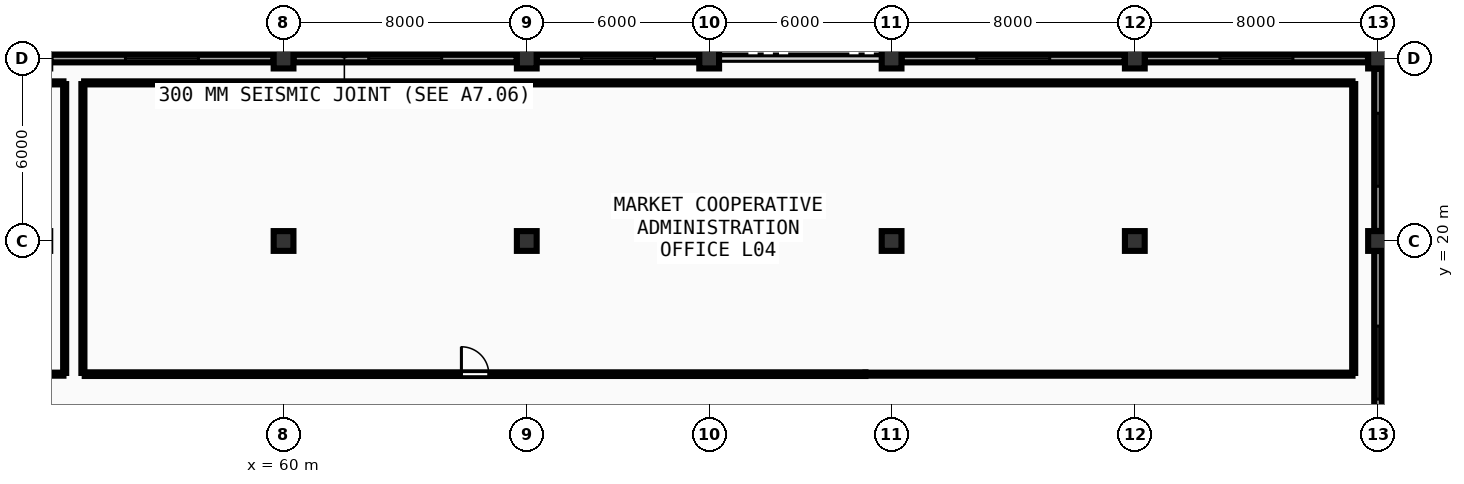
"""IFC4 building model, lengths in metres.
Left out: names, types, materials, properties, quantities, classifications, styles, units other than length and angle.
Written with IfcOpenShell. Run it as: python <this file> out.ifc"""

import sys

from ifc_helpers import new_model, si_unit, direction, frame, frame_2d, origin, origin_2d, place, context, subcontext, project, spatial, rectangle, extrude, element, fill, save


model = new_model("IFC4")
c1 = context("Model", 3, precision=1e-05, world=origin(), true_north=direction((0.0, 1.0)))
c2 = subcontext(c1, "Body", "Model", "MODEL_VIEW")
j1 = project(units=[si_unit("LENGTHUNIT", "METRE"), si_unit("PLANEANGLEUNIT", "RADIAN")], contexts=[c1])
p1 = place(None, origin())
s1 = spatial("IfcSite", under=j1, at=p1, CompositionType="ELEMENT")
p2 = place(p1, origin())
s2 = spatial("IfcBuilding", under=s1, at=p2, CompositionType="ELEMENT")
p3 = place(p2, frame((0.0, 0.0, 18.0)))
s3 = spatial("IfcBuildingStorey", under=s2, at=p3, CompositionType="ELEMENT", Elevation=18.0)
for number, where, z_axis, x_axis in (
    (1, (60.0, 20.0, 0.0), (0.0, 0.0, 1.0), (1.0, 0.0, 0.0)),
    (2, (60.0, 26.0, 0.0), (0.0, 0.0, 1.0), (1.0, 0.0, 0.0)),
    (3, (68.0, 20.0, 0.0), (0.0, 0.0, 1.0), (1.0, 0.0, 0.0)),
    (4, (68.0, 26.0, 0.0), (0.0, 0.0, 1.0), (1.0, 0.0, 0.0)),
    (5, (74.0, 20.0, 0.0), (0.0, 0.0, 1.0), (1.0, 0.0, 0.0)),
    (6, (74.0, 26.0, 0.0), (0.0, 0.0, 1.0), (1.0, 0.0, 0.0)),
    (7, (80.0, 20.0, 0.0), (0.0, 0.0, 1.0), (1.0, 0.0, 0.0)),
    (8, (80.0, 26.0, 0.0), (0.0, 0.0, 1.0), (1.0, 0.0, 0.0)),
    (9, (88.0, 20.0, 0.0), (0.0, 0.0, 1.0), (1.0, 0.0, 0.0)),
    (10, (88.0, 26.0, 0.0), (0.0, 0.0, 1.0), (1.0, 0.0, 0.0)),
    (11, (96.0, 20.0, 0.0), (0.0, 0.0, 1.0), (1.0, 0.0, 0.0)),
    (12, (96.0, 26.0, 0.0), (0.0, 0.0, 1.0), (1.0, 0.0, 0.0)),
):
    element("IfcColumn", number, at=place(p3, frame(where, z_axis=z_axis, x_axis=x_axis)), inside=s3, PredefinedType="COLUMN", context=c2, shape_type="SweptSolid", body=[
        extrude(rectangle(XDim=0.65, YDim=0.65, at=origin_2d()), origin(), (0.0, 0.0, 1.0), 4.5),
    ])
p4 = place(p3, frame((96.0, 12.33, 0.0), z_axis=(0.0, 0.0, 1.0), x_axis=(0.0, 1.0, 0.0)))
e13 = element("IfcWall", 13, at=p4, inside=s3, PredefinedType="SOLIDWALL", context=c2, shape_type="SweptSolid", body=[
    extrude(rectangle(XDim=7.34, YDim=0.25, at=frame_2d((3.67, 0.0))), origin(), (0.0, 0.0, 1.0), 3.44),
])
p5 = place(p4, frame((2.47, 0.0, 0.95)))
e14 = element("IfcOpeningElement", 14, at=p5, cuts=e13, PredefinedType="OPENING", context=c2, shape_type="SweptSolid", body=[
    extrude(rectangle(XDim=2.4, YDim=1.65, at=frame_2d((1.2, 0.825))), frame((0.0, 0.135, 0.0), z_axis=(0.0, -1.0, 0.0), x_axis=(1.0, 0.0, 0.0)), (0.0, 0.0, 1.0), 0.27),
])
p6 = place(p3, frame((96.0, 20.33, 0.0), z_axis=(0.0, 0.0, 1.0), x_axis=(0.0, 1.0, 0.0)))
e15 = element("IfcWall", 15, at=p6, inside=s3, PredefinedType="SOLIDWALL", context=c2, shape_type="SweptSolid", body=[
    extrude(rectangle(XDim=5.34, YDim=0.25, at=frame_2d((2.67, 0.0))), origin(), (0.0, 0.0, 1.0), 3.44),
])
p7 = place(p6, frame((1.47, 0.0, 0.95)))
e16 = element("IfcOpeningElement", 16, at=p7, cuts=e15, PredefinedType="OPENING", context=c2, shape_type="SweptSolid", body=[
    extrude(rectangle(XDim=2.4, YDim=1.65, at=frame_2d((1.2, 0.825))), frame((0.0, 0.135, 0.0), z_axis=(0.0, -1.0, 0.0), x_axis=(1.0, 0.0, 0.0)), (0.0, 0.0, 1.0), 0.27),
])
p8 = place(p3, frame((95.67, 26.0, 0.0), z_axis=(0.0, 0.0, 1.0), x_axis=(-1.0, 0.0, 0.0)))
e17 = element("IfcWall", 17, at=p8, inside=s3, PredefinedType="SOLIDWALL", context=c2, shape_type="SweptSolid", body=[
    extrude(rectangle(XDim=7.34, YDim=0.25, at=frame_2d((3.67, 0.0))), origin(), (0.0, 0.0, 1.0), 3.44),
])
p9 = place(p8, frame((2.47, 0.0, 0.95)))
e18 = element("IfcOpeningElement", 18, at=p9, cuts=e17, PredefinedType="OPENING", context=c2, shape_type="SweptSolid", body=[
    extrude(rectangle(XDim=2.4, YDim=1.65, at=frame_2d((1.2, 0.825))), frame((0.0, 0.135, 0.0), z_axis=(0.0, -1.0, 0.0), x_axis=(1.0, 0.0, 0.0)), (0.0, 0.0, 1.0), 0.27),
])
p10 = place(p3, frame((87.67, 26.0, 0.0), z_axis=(0.0, 0.0, 1.0), x_axis=(-1.0, 0.0, 0.0)))
e19 = element("IfcWall", 19, at=p10, inside=s3, PredefinedType="SOLIDWALL", context=c2, shape_type="SweptSolid", body=[
    extrude(rectangle(XDim=7.34, YDim=0.25, at=frame_2d((3.67, 0.0))), origin(), (0.0, 0.0, 1.0), 3.44),
])
p11 = place(p10, frame((2.47, 0.0, 0.95)))
e20 = element("IfcOpeningElement", 20, at=p11, cuts=e19, PredefinedType="OPENING", context=c2, shape_type="SweptSolid", body=[
    extrude(rectangle(XDim=2.4, YDim=1.65, at=frame_2d((1.2, 0.825))), frame((0.0, 0.135, 0.0), z_axis=(0.0, -1.0, 0.0), x_axis=(1.0, 0.0, 0.0)), (0.0, 0.0, 1.0), 0.27),
])
p12 = place(p3, frame((73.67, 26.0, 0.0), z_axis=(0.0, 0.0, 1.0), x_axis=(-1.0, 0.0, 0.0)))
e21 = element("IfcWall", 21, at=p12, inside=s3, PredefinedType="SOLIDWALL", context=c2, shape_type="SweptSolid", body=[
    extrude(rectangle(XDim=5.34, YDim=0.25, at=frame_2d((2.67, 0.0))), origin(), (0.0, 0.0, 1.0), 3.44),
])
p13 = place(p12, frame((1.47, 0.0, 0.95)))
e22 = element("IfcOpeningElement", 22, at=p13, cuts=e21, PredefinedType="OPENING", context=c2, shape_type="SweptSolid", body=[
    extrude(rectangle(XDim=2.4, YDim=1.65, at=frame_2d((1.2, 0.825))), frame((0.0, 0.135, 0.0), z_axis=(0.0, -1.0, 0.0), x_axis=(1.0, 0.0, 0.0)), (0.0, 0.0, 1.0), 0.27),
])
p14 = place(p3, frame((67.67, 26.0, 0.0), z_axis=(0.0, 0.0, 1.0), x_axis=(-1.0, 0.0, 0.0)))
e23 = element("IfcWall", 23, at=p14, inside=s3, PredefinedType="SOLIDWALL", context=c2, shape_type="SweptSolid", body=[
    extrude(rectangle(XDim=7.34, YDim=0.25, at=frame_2d((3.67, 0.0))), origin(), (0.0, 0.0, 1.0), 3.44),
])
p15 = place(p14, frame((2.47, 0.0, 0.95)))
e24 = element("IfcOpeningElement", 24, at=p15, cuts=e23, PredefinedType="OPENING", context=c2, shape_type="SweptSolid", body=[
    extrude(rectangle(XDim=2.4, YDim=1.65, at=frame_2d((1.2, 0.825))), frame((0.0, 0.135, 0.0), z_axis=(0.0, -1.0, 0.0), x_axis=(1.0, 0.0, 0.0)), (0.0, 0.0, 1.0), 0.27),
])
p16 = place(p3, frame((59.67, 26.0, 0.0), z_axis=(0.0, 0.0, 1.0), x_axis=(-1.0, 0.0, 0.0)))
e25 = element("IfcWall", 25, at=p16, inside=s3, PredefinedType="SOLIDWALL", context=c2, shape_type="SweptSolid", body=[
    extrude(rectangle(XDim=7.34, YDim=0.25, at=frame_2d((3.67, 0.0))), origin(), (0.0, 0.0, 1.0), 3.44),
])
p17 = place(p16, frame((2.47, 0.0, 0.95)))
e26 = element("IfcOpeningElement", 26, at=p17, cuts=e25, PredefinedType="OPENING", context=c2, shape_type="SweptSolid", body=[
    extrude(rectangle(XDim=2.4, YDim=1.65, at=frame_2d((1.2, 0.825))), frame((0.0, 0.135, 0.0), z_axis=(0.0, -1.0, 0.0), x_axis=(1.0, 0.0, 0.0)), (0.0, 0.0, 1.0), 0.27),
])
p18 = place(p3, frame((53.46, 15.62, 0.0), z_axis=(0.0, 0.0, 1.0), x_axis=(1.0, 0.0, 0.0)))
e27 = element("IfcWall", 27, at=p18, inside=s3, PredefinedType="PARTITIONING", context=c2, shape_type="SweptSolid", body=[
    extrude(rectangle(XDim=25.68, YDim=0.12, at=frame_2d((12.84, 0.0))), origin(), (0.0, 0.0, 1.0), 3.445),
])
p19 = place(p18, frame((12.39, 0.0, 0.0)))
e28 = element("IfcOpeningElement", 28, at=p19, cuts=e27, PredefinedType="OPENING", context=c2, shape_type="SweptSolid", body=[
    extrude(rectangle(XDim=0.9, YDim=2.08, at=frame_2d((0.45, 1.04))), frame((0.0, 0.07, 0.0), z_axis=(0.0, -1.0, 0.0), x_axis=(1.0, 0.0, 0.0)), (0.0, 0.0, 1.0), 0.14),
])
p20 = place(p3, frame((51.14, 15.62, 0.0), z_axis=(0.0, 0.0, 1.0), x_axis=(1.0, 0.0, 0.0)))
e29 = element("IfcWall", 29, at=p20, inside=s3, PredefinedType="PARTITIONING", context=c2, shape_type="SweptSolid", body=[
    extrude(rectangle(XDim=1.62, YDim=0.1, at=frame_2d((0.81, 0.0))), origin(), (0.0, 0.0, 1.0), 3.445),
])
p21 = place(p3, frame((52.8, 15.66, 0.0), z_axis=(0.0, 0.0, 1.0), x_axis=(0.0, 1.0, 0.0)))
e30 = element("IfcWall", 30, at=p21, inside=s3, PredefinedType="PARTITIONING", context=c2, shape_type="SweptSolid", body=[
    extrude(rectangle(XDim=9.5, YDim=0.1, at=frame_2d((4.75, 0.0))), origin(), (0.0, 0.0, 1.0), 3.445),
])
p22 = place(p3, frame((52.76, 25.2, 0.0), z_axis=(0.0, 0.0, 1.0), x_axis=(-1.0, 0.0, 0.0)))
e31 = element("IfcWall", 31, at=p22, inside=s3, PredefinedType="PARTITIONING", context=c2, shape_type="SweptSolid", body=[
    extrude(rectangle(XDim=15.92, YDim=0.1, at=frame_2d((7.96, 0.0))), origin(), (0.0, 0.0, 1.0), 3.445),
])
p23 = place(p3, frame((79.14, 15.62, 0.0), z_axis=(0.0, 0.0, 1.0), x_axis=(1.0, 0.0, 0.0)))
e32 = element("IfcWall", 32, at=p23, inside=s3, PredefinedType="PARTITIONING", context=c2, shape_type="SweptSolid", body=[
    extrude(rectangle(XDim=16.02, YDim=0.1, at=frame_2d((8.01, 0.0))), origin(), (0.0, 0.0, 1.0), 3.445),
])
p24 = place(p3, frame((95.2, 15.66, 0.0), z_axis=(0.0, 0.0, 1.0), x_axis=(0.0, 1.0, 0.0)))
e33 = element("IfcWall", 33, at=p24, inside=s3, PredefinedType="PARTITIONING", context=c2, shape_type="SweptSolid", body=[
    extrude(rectangle(XDim=9.5, YDim=0.1, at=frame_2d((4.75, 0.0))), origin(), (0.0, 0.0, 1.0), 3.445),
])
p25 = place(p3, frame((95.16, 25.2, 0.0), z_axis=(0.0, 0.0, 1.0), x_axis=(-1.0, 0.0, 0.0)))
e34 = element("IfcWall", 34, at=p25, inside=s3, PredefinedType="PARTITIONING", context=c2, shape_type="SweptSolid", body=[
    extrude(rectangle(XDim=41.72, YDim=0.1, at=frame_2d((20.86, 0.0))), origin(), (0.0, 0.0, 1.0), 3.445),
])
p26 = place(p3, frame((53.4, 25.16, 0.0), z_axis=(0.0, 0.0, 1.0), x_axis=(0.0, -1.0, 0.0)))
e35 = element("IfcWall", 35, at=p26, inside=s3, PredefinedType="PARTITIONING", context=c2, shape_type="SweptSolid", body=[
    extrude(rectangle(XDim=9.5, YDim=0.1, at=frame_2d((4.75, 0.0))), origin(), (0.0, 0.0, 1.0), 3.445),
])
p27 = place(p5, origin())
e36 = element("IfcWindow", 36, at=p27, inside=s3, PartitioningType="SINGLE_PANEL", PredefinedType="WINDOW", context=c2, shape_type="SweptSolid", body=[
    extrude(rectangle(XDim=2.4, YDim=1.65, at=frame_2d((1.2, 0.825))), frame((0.0, 0.03, 0.0), z_axis=(0.0, -1.0, 0.0), x_axis=(1.0, 0.0, 0.0)), (0.0, 0.0, 1.0), 0.06),
])
fill(e14, e36)
p28 = place(p7, origin())
e37 = element("IfcWindow", 37, at=p28, inside=s3, PartitioningType="SINGLE_PANEL", PredefinedType="WINDOW", context=c2, shape_type="SweptSolid", body=[
    extrude(rectangle(XDim=2.4, YDim=1.65, at=frame_2d((1.2, 0.825))), frame((0.0, 0.03, 0.0), z_axis=(0.0, -1.0, 0.0), x_axis=(1.0, 0.0, 0.0)), (0.0, 0.0, 1.0), 0.06),
])
fill(e16, e37)
p29 = place(p9, origin())
e38 = element("IfcWindow", 38, at=p29, inside=s3, PartitioningType="SINGLE_PANEL", PredefinedType="WINDOW", context=c2, shape_type="SweptSolid", body=[
    extrude(rectangle(XDim=2.4, YDim=1.65, at=frame_2d((1.2, 0.825))), frame((0.0, 0.03, 0.0), z_axis=(0.0, -1.0, 0.0), x_axis=(1.0, 0.0, 0.0)), (0.0, 0.0, 1.0), 0.06),
])
fill(e18, e38)
p30 = place(p11, origin())
e39 = element("IfcWindow", 39, at=p30, inside=s3, PartitioningType="SINGLE_PANEL", PredefinedType="WINDOW", context=c2, shape_type="SweptSolid", body=[
    extrude(rectangle(XDim=2.4, YDim=1.65, at=frame_2d((1.2, 0.825))), frame((0.0, 0.03, 0.0), z_axis=(0.0, -1.0, 0.0), x_axis=(1.0, 0.0, 0.0)), (0.0, 0.0, 1.0), 0.06),
])
fill(e20, e39)
p31 = place(p13, origin())
e40 = element("IfcWindow", 40, at=p31, inside=s3, PartitioningType="SINGLE_PANEL", PredefinedType="WINDOW", context=c2, shape_type="SweptSolid", body=[
    extrude(rectangle(XDim=2.4, YDim=1.65, at=frame_2d((1.2, 0.825))), frame((0.0, 0.03, 0.0), z_axis=(0.0, -1.0, 0.0), x_axis=(1.0, 0.0, 0.0)), (0.0, 0.0, 1.0), 0.06),
])
fill(e22, e40)
p32 = place(p15, origin())
e41 = element("IfcWindow", 41, at=p32, inside=s3, PartitioningType="SINGLE_PANEL", PredefinedType="WINDOW", context=c2, shape_type="SweptSolid", body=[
    extrude(rectangle(XDim=2.4, YDim=1.65, at=frame_2d((1.2, 0.825))), frame((0.0, 0.03, 0.0), z_axis=(0.0, -1.0, 0.0), x_axis=(1.0, 0.0, 0.0)), (0.0, 0.0, 1.0), 0.06),
])
fill(e24, e41)
p33 = place(p17, origin())
e42 = element("IfcWindow", 42, at=p33, inside=s3, PartitioningType="SINGLE_PANEL", PredefinedType="WINDOW", context=c2, shape_type="SweptSolid", body=[
    extrude(rectangle(XDim=2.4, YDim=1.65, at=frame_2d((1.2, 0.825))), frame((0.0, 0.03, 0.0), z_axis=(0.0, -1.0, 0.0), x_axis=(1.0, 0.0, 0.0)), (0.0, 0.0, 1.0), 0.06),
])
fill(e26, e42)
p34 = place(p19, origin())
e43 = element("IfcDoor", 43, at=p34, inside=s3, OperationType="SINGLE_SWING_LEFT", PredefinedType="DOOR", context=c2, shape_type="SweptSolid", body=[
    extrude(rectangle(XDim=0.9, YDim=2.08, at=frame_2d((0.45, 1.04))), frame((0.0, 0.025, 0.0), z_axis=(0.0, -1.0, 0.0), x_axis=(1.0, 0.0, 0.0)), (0.0, 0.0, 1.0), 0.05),
])
fill(e28, e43)
save(model, sys.argv[1])
